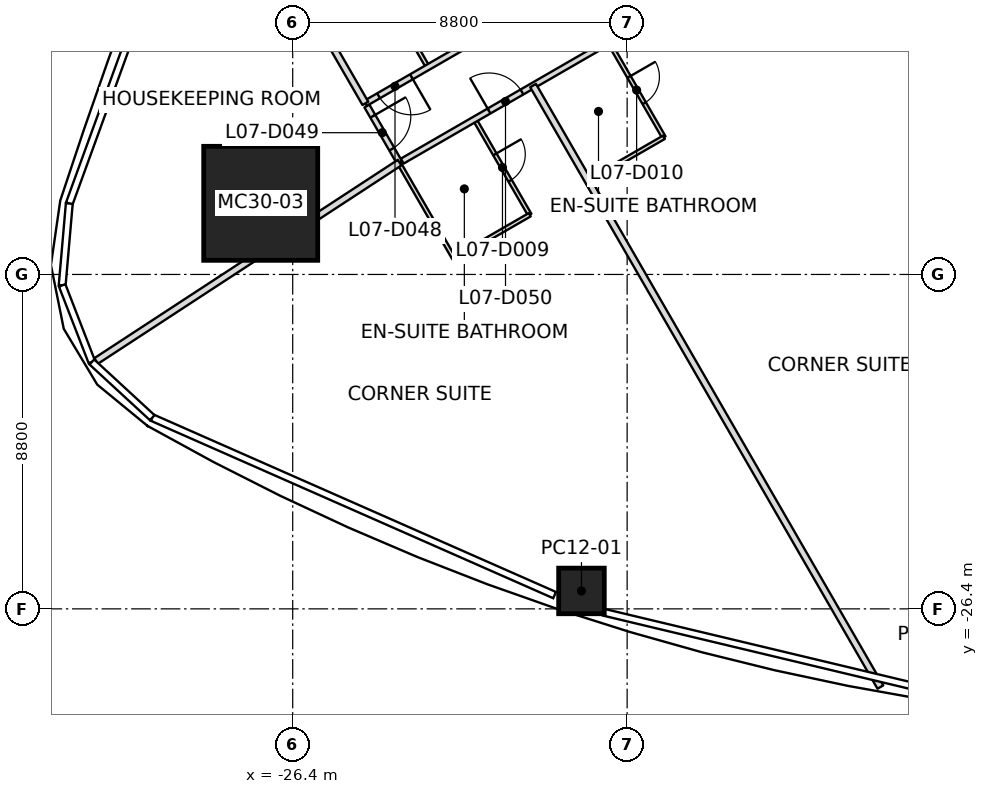
"""IFC4 building model, lengths in metres.
Left out: names, types, materials, properties, quantities, classifications, styles, units other than length and angle.
Written with IfcOpenShell. Run it as: python <this file> out.ifc"""

import sys

from ifc_helpers import new_model, si_unit, direction, frame, frame_2d, origin, origin_2d, place, context, subcontext, project, spatial, rectangle, extrude, clip, halfspace, element, fill, save


model = new_model("IFC4")
c1 = context("Model", 3, precision=1e-05, world=origin(), true_north=direction((0.0, 1.0)))
c2 = subcontext(c1, "Body", "Model", "MODEL_VIEW")
j1 = project(units=[si_unit("LENGTHUNIT", "METRE"), si_unit("PLANEANGLEUNIT", "RADIAN")], contexts=[c1])
p1 = place(None, origin())
s1 = spatial("IfcSite", under=j1, at=p1, CompositionType="ELEMENT")
p2 = place(p1, origin())
s2 = spatial("IfcBuilding", under=s1, at=p2, CompositionType="ELEMENT")
p3 = place(p2, frame((0.0, 0.0, 48.0)))
s3 = spatial("IfcBuildingStorey", under=s2, at=p3, CompositionType="ELEMENT", Elevation=48.0)
p4 = place(p3, frame((-27.242, -15.728, 0.0), z_axis=(0.030597838594, 0.017672889533, 0.99937552564), x_axis=(0.99953177652, -0.000541005533, -0.030593055416)))
e1 = element("IfcColumn", 1, at=p4, inside=s3, PredefinedType="COLUMN", context=c2, shape_type="SweptSolid", body=[
    clip(extrude(rectangle(XDim=3.0, YDim=3.0, at=origin_2d()), origin(), (0.0, 0.0, 1.0), 3.702), halfspace(frame((0.0, 0.0, 0.018)), True)),
])
p5 = place(p3, frame((-18.802, -25.928, 0.0), z_axis=(0.019020345186, 0.17825893475, 0.983799765527), x_axis=(-0.950332394894, 0.308956292564, -0.037607824987)))
e2 = element("IfcColumn", 2, at=p5, inside=s3, PredefinedType="COLUMN", context=c2, shape_type="SweptSolid", body=[
    clip(clip(extrude(rectangle(XDim=1.2, YDim=1.2, at=origin_2d()), origin(), (0.0, 0.0, 1.0), 3.761), halfspace(frame((0.0, 0.0, 0.008)), True)), halfspace(frame((0.0, 0.0, 3.76)), False)),
])
p6 = place(p3, frame((-31.573, -19.877, 0.0), z_axis=(0.0, 0.0, 1.0), x_axis=(0.837059317436, 0.547112144898, 0.0)))
e3 = element("IfcWall", 3, at=p6, inside=s3, PredefinedType="PARTITIONING", context=c2, shape_type="SweptSolid", body=[
    extrude(rectangle(XDim=9.54, YDim=0.175, at=frame_2d((4.77, 0.0))), origin(), (0.0, 0.0, 1.0), 2.934),
])
p7 = place(p3, frame((-24.488, -13.099, 0.0), z_axis=(0.0, 0.0, 1.0), x_axis=(-0.500003147101, 0.866023586797, 0.0)))
e4 = element("IfcWall", 4, at=p7, inside=s3, PredefinedType="PARTITIONING", context=c2, shape_type="SweptSolid", body=[
    extrude(rectangle(XDim=8.508, YDim=0.175, at=frame_2d((4.254, 0.0))), origin(), (0.0, 0.0, 1.0), 2.934),
])
p8 = place(p3, frame((-20.075, -12.629, 0.0), z_axis=(0.0, 0.0, 1.0), x_axis=(0.500000727794, -0.866024983592, 0.0)))
e5 = element("IfcWall", 5, at=p8, inside=s3, PredefinedType="PARTITIONING", context=c2, shape_type="SweptSolid", body=[
    extrude(rectangle(XDim=18.277, YDim=0.175, at=frame_2d((9.139, 0.0))), origin(), (0.0, 0.0, 1.0), 2.797),
])
p9 = place(p3, frame((-12.8, -6.351, 0.0), z_axis=(0.0, 0.0, 1.0), x_axis=(-0.866024715125, -0.500001192792, 0.0)))
e6 = element("IfcWall", 6, at=p9, inside=s3, PredefinedType="PARTITIONING", context=c2, shape_type="SweptSolid", body=[
    extrude(rectangle(XDim=13.496, YDim=0.15, at=frame_2d((6.748, 0.0))), origin(), (0.0, 0.0, 1.0), 2.947),
])
p10 = place(p9, frame((7.896, 0.0, 0.0)))
e7 = element("IfcOpeningElement", 7, at=p10, cuts=e6, PredefinedType="OPENING", context=c2, shape_type="SweptSolid", body=[
    extrude(rectangle(XDim=1.0, YDim=2.1, at=frame_2d((0.5, 1.05))), frame((0.0, 0.075, 0.0), z_axis=(0.0, -1.0, 0.0), x_axis=(1.0, 0.0, 0.0)), (0.0, 0.0, 1.0), 0.15),
])
p11 = place(p9, frame((12.095, 0.0, 0.0)))
e8 = element("IfcOpeningElement", 8, at=p11, cuts=e6, PredefinedType="OPENING", context=c2, shape_type="SweptSolid", body=[
    extrude(rectangle(XDim=1.0, YDim=2.1, at=frame_2d((0.5, 1.05))), frame((0.0, 0.075, 0.0), z_axis=(0.0, -1.0, 0.0), x_axis=(1.0, 0.0, 0.0)), (0.0, 0.0, 1.0), 0.15),
])
p12 = place(p3, frame((-24.448, -13.168, 0.0), z_axis=(0.0, 0.0, 1.0), x_axis=(0.500062383118, -0.865989383878, 0.0)))
e9 = element("IfcWall", 9, at=p12, inside=s3, PredefinedType="PARTITIONING", context=c2, shape_type="SweptSolid", body=[
    extrude(rectangle(XDim=1.72, YDim=0.15, at=frame_2d((0.86, 0.0))), origin(), (0.0, 0.0, 1.0), 2.797),
])
p13 = place(p12, frame((0.31, 0.0, 0.0)))
e10 = element("IfcOpeningElement", 10, at=p13, cuts=e9, PredefinedType="OPENING", context=c2, shape_type="SweptSolid", body=[
    extrude(rectangle(XDim=1.0, YDim=2.1, at=frame_2d((0.5, 1.05))), frame((0.0, 0.075, 0.0), z_axis=(0.0, -1.0, 0.0), x_axis=(1.0, 0.0, 0.0)), (0.0, 0.0, 1.0), 0.15),
])
p14 = place(p3, frame((-23.518, -14.617, 0.0), z_axis=(0.0, 0.0, 1.0), x_axis=(0.866023964651, 0.500002492643, 0.0)))
e11 = element("IfcWall", 11, at=p14, inside=s3, PredefinedType="PARTITIONING", context=c2, shape_type="SweptSolid", body=[
    extrude(rectangle(XDim=12.376, YDim=0.15, at=frame_2d((6.188, 0.0))), origin(), (0.0, 0.0, 1.0), 2.797),
])
p15 = place(p14, frame((2.638, 0.0, 0.0)))
e12 = element("IfcOpeningElement", 12, at=p15, cuts=e11, PredefinedType="OPENING", context=c2, shape_type="SweptSolid", body=[
    extrude(rectangle(XDim=1.0, YDim=2.1, at=frame_2d((0.5, 1.05))), frame((0.0, 0.075, 0.0), z_axis=(0.0, -1.0, 0.0), x_axis=(1.0, 0.0, 0.0)), (0.0, 0.0, 1.0), 0.15),
])
p16 = place(p14, frame((8.876, 0.0, 0.0)))
e13 = element("IfcOpeningElement", 13, at=p16, cuts=e11, PredefinedType="OPENING", context=c2, shape_type="SweptSolid", body=[
    extrude(rectangle(XDim=1.0, YDim=2.1, at=frame_2d((0.5, 1.05))), frame((0.0, 0.075, 0.0), z_axis=(0.0, -1.0, 0.0), x_axis=(1.0, 0.0, 0.0)), (0.0, 0.0, 1.0), 0.15),
])
p17 = place(p3, frame((-21.598, -13.543, 0.0), z_axis=(0.0, 0.0, 1.0), x_axis=(0.499936001555, -0.866062350151, 0.0)))
e14 = element("IfcWall", 14, at=p17, inside=s3, PredefinedType="PARTITIONING", context=c2, shape_type="SweptSolid", body=[
    extrude(rectangle(XDim=2.87, YDim=0.1, at=frame_2d((1.435, 0.0))), origin(), (0.0, 0.0, 1.0), 3.15),
])
p18 = place(p17, frame((1.035, 0.0, 0.0)))
e15 = element("IfcOpeningElement", 15, at=p18, cuts=e14, PredefinedType="OPENING", context=c2, shape_type="SweptSolid", body=[
    extrude(rectangle(XDim=0.8, YDim=2.1, at=frame_2d((0.4, 1.05))), frame((0.0, 0.05, 0.0), z_axis=(0.0, -1.0, 0.0), x_axis=(1.0, 0.0, 0.0)), (0.0, 0.0, 1.0), 0.1),
])
p19 = place(p3, frame((-20.163, -16.029, 0.0), z_axis=(0.0, 0.0, 1.0), x_axis=(-0.86602648383, -0.499998129301, 0.0)))
e16 = element("IfcWall", 16, at=p19, inside=s3, PredefinedType="PARTITIONING", context=c2, shape_type="SweptSolid", body=[
    extrude(rectangle(XDim=2.3, YDim=0.1, at=frame_2d((1.15, 0.0))), origin(), (0.0, 0.0, 1.0), 3.15),
])
p20 = place(p3, frame((-22.155, -17.179, 0.0), z_axis=(0.0, 0.0, 1.0), x_axis=(-0.500036638401, 0.866004249561, 0.0)))
e17 = element("IfcWall", 17, at=p20, inside=s3, PredefinedType="PARTITIONING", context=c2, shape_type="SweptSolid", body=[
    extrude(rectangle(XDim=2.87, YDim=0.1, at=frame_2d((1.435, 0.0))), origin(), (0.0, 0.0, 1.0), 3.15),
])
p21 = place(p3, frame((-22.857, -12.123, 0.0), z_axis=(0.0, 0.0, 1.0), x_axis=(-0.499936001555, 0.866062350151, 0.0)))
e18 = element("IfcWall", 18, at=p21, inside=s3, PredefinedType="PARTITIONING", context=c2, shape_type="SweptSolid", body=[
    extrude(rectangle(XDim=2.87, YDim=0.1, at=frame_2d((1.435, 0.0))), origin(), (0.0, 0.0, 1.0), 3.15),
])
p22 = place(p21, frame((1.035, 0.0, 0.0)))
e19 = element("IfcOpeningElement", 19, at=p22, cuts=e18, PredefinedType="OPENING", context=c2, shape_type="SweptSolid", body=[
    extrude(rectangle(XDim=0.8, YDim=2.1, at=frame_2d((0.4, 1.05))), frame((0.0, 0.05, 0.0), z_axis=(0.0, -1.0, 0.0), x_axis=(1.0, 0.0, 0.0)), (0.0, 0.0, 1.0), 0.1),
])
p23 = place(p3, frame((-18.068, -11.505, 0.0), z_axis=(0.0, 0.0, 1.0), x_axis=(0.500036638401, -0.866004249561, 0.0)))
e20 = element("IfcWall", 20, at=p23, inside=s3, PredefinedType="PARTITIONING", context=c2, shape_type="SweptSolid", body=[
    extrude(rectangle(XDim=2.87, YDim=0.1, at=frame_2d((1.435, 0.0))), origin(), (0.0, 0.0, 1.0), 2.797),
])
p24 = place(p23, frame((1.035, 0.0, 0.0)))
e21 = element("IfcOpeningElement", 21, at=p24, cuts=e20, PredefinedType="OPENING", context=c2, shape_type="SweptSolid", body=[
    extrude(rectangle(XDim=0.8, YDim=2.1, at=frame_2d((0.4, 1.05))), frame((0.0, 0.05, 0.0), z_axis=(0.0, -1.0, 0.0), x_axis=(1.0, 0.0, 0.0)), (0.0, 0.0, 1.0), 0.1),
])
p25 = place(p3, frame((-16.633, -13.991, 0.0), z_axis=(0.0, 0.0, 1.0), x_axis=(-0.866017224141, -0.500014167291, 0.0)))
e22 = element("IfcWall", 22, at=p25, inside=s3, PredefinedType="PARTITIONING", context=c2, shape_type="SweptSolid", body=[
    extrude(rectangle(XDim=2.27, YDim=0.1, at=frame_2d((1.135, 0.0))), origin(), (0.0, 0.0, 1.0), 3.15),
])
p26 = place(p11, origin())
e23 = element("IfcDoor", 23, at=p26, inside=s3, OperationType="SINGLE_SWING_LEFT", PredefinedType="DOOR", context=c2, shape_type="SweptSolid", body=[
    extrude(rectangle(XDim=1.0, YDim=2.1, at=frame_2d((0.5, 1.05))), frame((0.0, 0.025, 0.0), z_axis=(0.0, -1.0, 0.0), x_axis=(1.0, 0.0, 0.0)), (0.0, 0.0, 1.0), 0.05),
])
fill(e8, e23)
p27 = place(p13, origin())
e24 = element("IfcDoor", 24, at=p27, inside=s3, OperationType="SINGLE_SWING_LEFT", PredefinedType="DOOR", context=c2, shape_type="SweptSolid", body=[
    extrude(rectangle(XDim=1.0, YDim=2.1, at=frame_2d((0.5, 1.05))), frame((0.0, 0.025, 0.0), z_axis=(0.0, -1.0, 0.0), x_axis=(1.0, 0.0, 0.0)), (0.0, 0.0, 1.0), 0.05),
])
fill(e10, e24)
p28 = place(p15, origin())
e25 = element("IfcDoor", 25, at=p28, inside=s3, OperationType="SINGLE_SWING_RIGHT", PredefinedType="DOOR", context=c2, shape_type="SweptSolid", body=[
    extrude(rectangle(XDim=1.0, YDim=2.1, at=frame_2d((0.5, 1.05))), frame((0.0, 0.025, 0.0), z_axis=(0.0, -1.0, 0.0), x_axis=(1.0, 0.0, 0.0)), (0.0, 0.0, 1.0), 0.05),
])
fill(e12, e25)
p29 = place(p18, origin())
e26 = element("IfcDoor", 26, at=p29, inside=s3, OperationType="SINGLE_SWING_LEFT", PredefinedType="DOOR", context=c2, shape_type="SweptSolid", body=[
    extrude(rectangle(XDim=0.8, YDim=2.1, at=frame_2d((0.4, 1.05))), frame((0.0, 0.025, 0.0), z_axis=(0.0, -1.0, 0.0), x_axis=(1.0, 0.0, 0.0)), (0.0, 0.0, 1.0), 0.05),
])
fill(e15, e26)
p30 = place(p24, origin())
e27 = element("IfcDoor", 27, at=p30, inside=s3, OperationType="SINGLE_SWING_LEFT", PredefinedType="DOOR", context=c2, shape_type="SweptSolid", body=[
    extrude(rectangle(XDim=0.8, YDim=2.1, at=frame_2d((0.4, 1.05))), frame((0.0, 0.025, 0.0), z_axis=(0.0, -1.0, 0.0), x_axis=(1.0, 0.0, 0.0)), (0.0, 0.0, 1.0), 0.05),
])
fill(e21, e27)
save(model, sys.argv[1])
